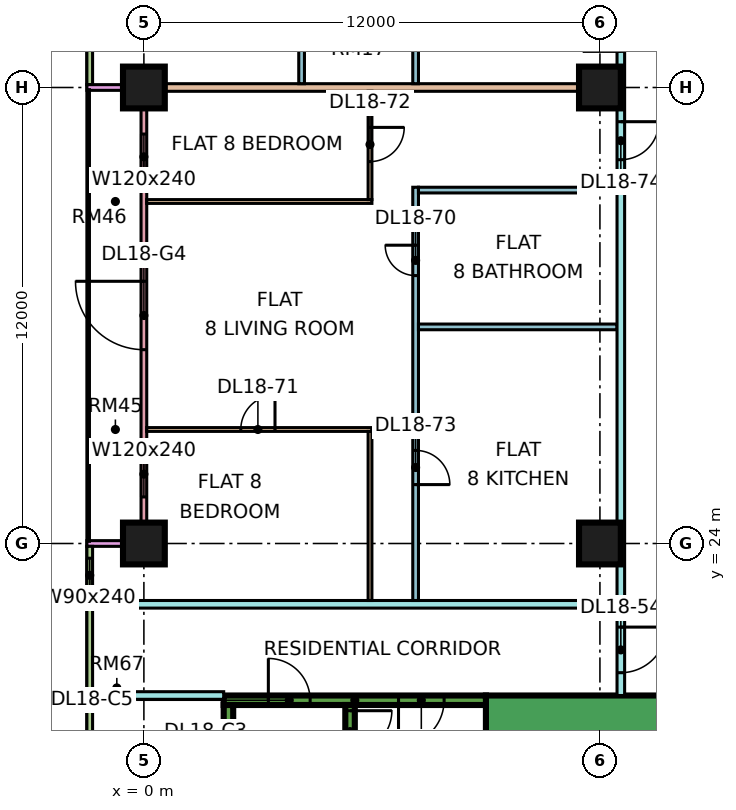
"""IFC4 building model, lengths in metres.
Left out: names, types, materials, properties, quantities, classifications, styles, units other than length and angle.
Written with IfcOpenShell. Run it as: python <this file> out.ifc"""

import sys

from ifc_helpers import new_model, si_unit, direction, frame, frame_2d, origin, origin_2d, place, context, subcontext, project, spatial, rectangle, extrude, element, fill, save


model = new_model("IFC4")
c1 = context("Model", 3, precision=1e-05, world=origin(), true_north=direction((0.0, 1.0)))
c2 = subcontext(c1, "Body", "Model", "MODEL_VIEW")
j1 = project(units=[si_unit("LENGTHUNIT", "METRE"), si_unit("PLANEANGLEUNIT", "RADIAN")], contexts=[c1])
p1 = place(None, origin())
s1 = spatial("IfcSite", under=j1, at=p1, CompositionType="ELEMENT")
p2 = place(p1, origin())
s2 = spatial("IfcBuilding", under=s1, at=p2, CompositionType="ELEMENT")
p3 = place(p2, frame((0.0, 0.0, 82.65)))
s3 = spatial("IfcBuildingStorey", under=s2, at=p3, CompositionType="ELEMENT", Elevation=82.65)
p4 = place(p3, frame((0.0, 24.0, 0.0), z_axis=(0.0, 0.0, 1.0), x_axis=(1.0, 0.0, 0.0)))
e1 = element("IfcColumn", 1, at=p4, inside=s3, PredefinedType="COLUMN", context=c2, shape_type="SweptSolid", body=[
    extrude(rectangle(XDim=1.1, YDim=1.1, at=origin_2d()), origin(), (0.0, 0.0, 1.0), 3.75),
])
p5 = place(p3, frame((0.0, 36.0, 0.0), z_axis=(0.0, 0.0, 1.0), x_axis=(1.0, 0.0, 0.0)))
e2 = element("IfcColumn", 2, at=p5, inside=s3, PredefinedType="COLUMN", context=c2, shape_type="SweptSolid", body=[
    extrude(rectangle(XDim=1.1, YDim=1.1, at=origin_2d()), origin(), (0.0, 0.0, 1.0), 3.75),
])
for number, where, z_axis, x_axis in (
    (3, (12.0, 24.0, 0.0), (0.0, 0.0, 1.0), (1.0, 0.0, 0.0)),
    (4, (12.0, 36.0, 0.0), (0.0, 0.0, 1.0), (1.0, 0.0, 0.0)),
):
    element("IfcColumn", number, at=place(p3, frame(where, z_axis=z_axis, x_axis=x_axis)), inside=s3, PredefinedType="COLUMN", context=c2, shape_type="SweptSolid", body=[
        extrude(rectangle(XDim=1.1, YDim=1.1, at=origin_2d()), origin(), (0.0, 0.0, 1.0), 3.75),
    ])
p6 = place(p3, frame((9.0, 19.45, 0.0), z_axis=(0.0, 0.0, 1.0), x_axis=(1.0, 0.0, 0.0)))
e5 = element("IfcWall", 5, at=p6, inside=s3, PredefinedType="SHEAR", context=c2, shape_type="SweptSolid", body=[
    extrude(rectangle(XDim=25.0, YDim=1.1, at=frame_2d((12.5, 0.0))), origin(), (0.0, 0.0, 1.0), 3.75),
])
p7 = place(p6, frame((19.1, 0.0, 0.0)))
e6 = element("IfcOpeningElement", 6, at=p7, cuts=e5, PredefinedType="OPENING", context=c2, shape_type="SweptSolid", body=[
    extrude(rectangle(XDim=1.8, YDim=2.4, at=frame_2d((0.9, 1.2))), frame((0.0, 0.56, 0.0), z_axis=(0.0, -1.0, 0.0), x_axis=(1.0, 0.0, 0.0)), (0.0, 0.0, 1.0), 1.12),
])
p8 = place(p3, frame((2.1, 19.875, 0.0), z_axis=(0.0, 0.0, 1.0), x_axis=(1.0, 0.0, 0.0)))
e7 = element("IfcWall", 7, at=p8, inside=s3, PredefinedType="SHEAR", context=c2, shape_type="SweptSolid", body=[
    extrude(rectangle(XDim=6.9, YDim=0.25, at=frame_2d((3.45, 0.0))), origin(), (0.0, 0.0, 1.0), 3.75),
])
p9 = place(p8, frame((1.175, 0.0, 0.0)))
e8 = element("IfcOpeningElement", 8, at=p9, cuts=e7, PredefinedType="OPENING", context=c2, shape_type="SweptSolid", body=[
    extrude(rectangle(XDim=1.1, YDim=2.2, at=frame_2d((0.55, 1.1))), frame((0.0, 0.135, 0.0), z_axis=(0.0, -1.0, 0.0), x_axis=(1.0, 0.0, 0.0)), (0.0, 0.0, 1.0), 0.27),
])
p10 = place(p8, frame((4.6, 0.0, 0.0)))
e9 = element("IfcOpeningElement", 9, at=p10, cuts=e7, PredefinedType="OPENING", context=c2, shape_type="SweptSolid", body=[
    extrude(rectangle(XDim=1.2, YDim=2.2, at=frame_2d((0.6, 1.1))), frame((0.0, 0.135, 0.0), z_axis=(0.0, -1.0, 0.0), x_axis=(1.0, 0.0, 0.0)), (0.0, 0.0, 1.0), 0.27),
])
p11 = place(p3, frame((2.225, 13.25, 0.0), z_axis=(0.0, 0.0, 1.0), x_axis=(0.0, 1.0, 0.0)))
e10 = element("IfcWall", 10, at=p11, inside=s3, PredefinedType="SHEAR", context=c2, shape_type="SweptSolid", body=[
    extrude(rectangle(XDim=6.5, YDim=0.25, at=frame_2d((3.25, 0.0))), origin(), (0.0, 0.0, 1.0), 3.75),
])
p12 = place(p3, frame((5.425, 13.25, 0.0), z_axis=(0.0, 0.0, 1.0), x_axis=(0.0, 1.0, 0.0)))
e11 = element("IfcWall", 11, at=p12, inside=s3, PredefinedType="SHEAR", context=c2, shape_type="SweptSolid", body=[
    extrude(rectangle(XDim=6.5, YDim=0.25, at=frame_2d((3.25, 0.0))), origin(), (0.0, 0.0, 1.0), 3.75),
])
p13 = place(p12, frame((5.25, 0.0, 0.0)))
e12 = element("IfcOpeningElement", 12, at=p13, cuts=e11, PredefinedType="OPENING", context=c2, shape_type="SweptSolid", body=[
    extrude(rectangle(XDim=1.1, YDim=2.2, at=frame_2d((0.55, 1.1))), frame((0.0, 0.135, 0.0), z_axis=(0.0, -1.0, 0.0), x_axis=(1.0, 0.0, 0.0)), (0.0, 0.0, 1.0), 0.27),
])
p14 = place(p3, frame((-1.425, 47.925, 0.0), z_axis=(0.0, 0.0, 1.0), x_axis=(0.0, -1.0, 0.0)))
e13 = element("IfcWall", 13, at=p14, inside=s3, PredefinedType="SOLIDWALL", context=c2, shape_type="SweptSolid", body=[
    extrude(rectangle(XDim=11.85, YDim=0.15, at=frame_2d((5.925, 0.0))), origin(), (0.0, 0.0, 1.0), 3.3),
])
p15 = place(p14, frame((1.462, 0.0, 0.45)))
e14 = element("IfcOpeningElement", 14, at=p15, cuts=e13, PredefinedType="OPENING", context=c2, shape_type="SweptSolid", body=[
    extrude(rectangle(XDim=3.0, YDim=2.4, at=frame_2d((1.5, 1.2))), frame((0.0, 0.085, 0.0), z_axis=(0.0, -1.0, 0.0), x_axis=(1.0, 0.0, 0.0)), (0.0, 0.0, 1.0), 0.17),
])
p16 = place(p14, frame((7.387, 0.0, 0.45)))
e15 = element("IfcOpeningElement", 15, at=p16, cuts=e13, PredefinedType="OPENING", context=c2, shape_type="SweptSolid", body=[
    extrude(rectangle(XDim=3.0, YDim=2.4, at=frame_2d((1.5, 1.2))), frame((0.0, 0.085, 0.0), z_axis=(0.0, -1.0, 0.0), x_axis=(1.0, 0.0, 0.0)), (0.0, 0.0, 1.0), 0.17),
])
p17 = place(p3, frame((0.0, 35.925, 0.0), z_axis=(0.0, 0.0, 1.0), x_axis=(0.0, -1.0, 0.0)))
e16 = element("IfcWall", 16, at=p17, inside=s3, PredefinedType="SOLIDWALL", context=c2, shape_type="SweptSolid", body=[
    extrude(rectangle(XDim=11.85, YDim=0.15, at=frame_2d((5.925, 0.0))), origin(), (0.0, 0.0, 1.0), 3.3),
])
p18 = place(p17, frame((1.15, 0.0, 0.45)))
e17 = element("IfcOpeningElement", 17, at=p18, cuts=e16, PredefinedType="OPENING", context=c2, shape_type="SweptSolid", body=[
    extrude(rectangle(XDim=1.2, YDim=2.4, at=frame_2d((0.6, 1.2))), frame((0.0, 0.085, 0.0), z_axis=(0.0, -1.0, 0.0), x_axis=(1.0, 0.0, 0.0)), (0.0, 0.0, 1.0), 0.17),
])
p19 = place(p17, frame((5.025, 0.0, 0.0)))
e18 = element("IfcOpeningElement", 18, at=p19, cuts=e16, PredefinedType="OPENING", context=c2, shape_type="SweptSolid", body=[
    extrude(rectangle(XDim=1.8, YDim=2.4, at=frame_2d((0.9, 1.2))), frame((0.0, 0.085, 0.0), z_axis=(0.0, -1.0, 0.0), x_axis=(1.0, 0.0, 0.0)), (0.0, 0.0, 1.0), 0.17),
])
p20 = place(p17, frame((9.5, 0.0, 0.45)))
e19 = element("IfcOpeningElement", 19, at=p20, cuts=e16, PredefinedType="OPENING", context=c2, shape_type="SweptSolid", body=[
    extrude(rectangle(XDim=1.2, YDim=2.4, at=frame_2d((0.6, 1.2))), frame((0.0, 0.085, 0.0), z_axis=(0.0, -1.0, 0.0), x_axis=(1.0, 0.0, 0.0)), (0.0, 0.0, 1.0), 0.17),
])
for number, where, z_axis, x_axis in (
    (20, (-1.5, 36.0, 0.0), (0.0, 0.0, 1.0), (1.0, 0.0, 0.0)),
    (21, (-1.5, 24.0, 0.0), (0.0, 0.0, 1.0), (1.0, 0.0, 0.0)),
):
    element("IfcWall", number, at=place(p3, frame(where, z_axis=z_axis, x_axis=x_axis)), inside=s3, PredefinedType="SOLIDWALL", context=c2, shape_type="SweptSolid", body=[
        extrude(rectangle(XDim=1.5, YDim=0.15, at=frame_2d((0.75, 0.0))), origin(), (0.0, 0.0, 1.0), 3.3),
    ])
p21 = place(p3, frame((-1.425, 23.925, 0.0), z_axis=(0.0, 0.0, 1.0), x_axis=(0.0, -1.0, 0.0)))
e22 = element("IfcWall", 22, at=p21, inside=s3, PredefinedType="SOLIDWALL", context=c2, shape_type="SweptSolid", body=[
    extrude(rectangle(XDim=11.425, YDim=0.15, at=frame_2d((5.712, 0.0))), origin(), (0.0, 0.0, 1.0), 3.3),
])
p22 = place(p21, frame((0.312, 0.0, 0.45)))
e23 = element("IfcOpeningElement", 23, at=p22, cuts=e22, PredefinedType="OPENING", context=c2, shape_type="SweptSolid", body=[
    extrude(rectangle(XDim=0.9, YDim=2.4, at=frame_2d((0.45, 1.2))), frame((0.0, 0.085, 0.0), z_axis=(0.0, -1.0, 0.0), x_axis=(1.0, 0.0, 0.0)), (0.0, 0.0, 1.0), 0.17),
])
p23 = place(p21, frame((6.175, 0.0, 0.45)))
e24 = element("IfcOpeningElement", 24, at=p23, cuts=e22, PredefinedType="OPENING", context=c2, shape_type="SweptSolid", body=[
    extrude(rectangle(XDim=3.0, YDim=2.4, at=frame_2d((1.5, 1.2))), frame((0.0, 0.085, 0.0), z_axis=(0.0, -1.0, 0.0), x_axis=(1.0, 0.0, 0.0)), (0.0, 0.0, 1.0), 0.17),
])
p24 = place(p3, frame((-1.35, 20.0, 0.0), z_axis=(0.0, 0.0, 1.0), x_axis=(1.0, 0.0, 0.0)))
e25 = element("IfcWall", 25, at=p24, inside=s3, PredefinedType="PARTITIONING", context=c2, shape_type="SweptSolid", body=[
    extrude(rectangle(XDim=3.45, YDim=0.2, at=frame_2d((1.725, 0.0))), origin(), (0.0, 0.0, 1.0), 3.3),
])
p25 = place(p3, frame((-1.35, 22.4, 0.0), z_axis=(0.0, 0.0, 1.0), x_axis=(1.0, 0.0, 0.0)))
e26 = element("IfcWall", 26, at=p25, inside=s3, PredefinedType="PARTITIONING", context=c2, shape_type="SweptSolid", body=[
    extrude(rectangle(XDim=13.8, YDim=0.2, at=frame_2d((6.9, 0.0))), origin(), (0.0, 0.0, 1.0), 3.3),
])
e27 = element("IfcWall", 27, at=p5, inside=s3, PredefinedType="PARTITIONING", context=c2, shape_type="SweptSolid", body=[
    extrude(rectangle(XDim=12.45, YDim=0.2, at=frame_2d((6.225, 0.0))), origin(), (0.0, 0.0, 1.0), 3.3),
])
p26 = place(p3, frame((0.074, 27.0, 0.0), z_axis=(0.0, 0.0, 1.0), x_axis=(1.0, 0.0, 0.0)))
e28 = element("IfcWall", 28, at=p26, inside=s3, PredefinedType="PARTITIONING", context=c2, shape_type="SweptSolid", body=[
    extrude(rectangle(XDim=5.926, YDim=0.1, at=frame_2d((2.963, 0.0))), origin(), (0.0, 0.0, 1.0), 3.3),
])
p27 = place(p26, frame((2.476, 0.0, 0.0)))
e29 = element("IfcOpeningElement", 29, at=p27, cuts=e28, PredefinedType="OPENING", context=c2, shape_type="SweptSolid", body=[
    extrude(rectangle(XDim=0.9, YDim=2.1, at=frame_2d((0.45, 1.05))), frame((0.0, 0.06, 0.0), z_axis=(0.0, -1.0, 0.0), x_axis=(1.0, 0.0, 0.0)), (0.0, 0.0, 1.0), 0.12),
])
p28 = place(p3, frame((0.074, 33.0, 0.0), z_axis=(0.0, 0.0, 1.0), x_axis=(1.0, 0.0, 0.0)))
e30 = element("IfcWall", 30, at=p28, inside=s3, PredefinedType="PARTITIONING", context=c2, shape_type="SweptSolid", body=[
    extrude(rectangle(XDim=5.926, YDim=0.1, at=frame_2d((2.963, 0.0))), origin(), (0.0, 0.0, 1.0), 3.3),
])
p29 = place(p3, frame((4.15, 36.1, 0.0), z_axis=(0.0, 0.0, 1.0), x_axis=(0.0, 1.0, 0.0)))
e31 = element("IfcWall", 31, at=p29, inside=s3, PredefinedType="PARTITIONING", context=c2, shape_type="SweptSolid", body=[
    extrude(rectangle(XDim=2.975, YDim=0.15, at=frame_2d((1.487, 0.0))), origin(), (0.0, 0.0, 1.0), 3.3),
])
p30 = place(p3, frame((5.95, 22.5, 0.0), z_axis=(0.0, 0.0, 1.0), x_axis=(0.0, 1.0, 0.0)))
e32 = element("IfcWall", 32, at=p30, inside=s3, PredefinedType="PARTITIONING", context=c2, shape_type="SweptSolid", body=[
    extrude(rectangle(XDim=4.45, YDim=0.1, at=frame_2d((2.225, 0.0))), origin(), (0.0, 0.0, 1.0), 3.3),
])
p31 = place(p3, frame((5.95, 33.05, 0.0), z_axis=(0.0, 0.0, 1.0), x_axis=(0.0, 1.0, 0.0)))
e33 = element("IfcWall", 33, at=p31, inside=s3, PredefinedType="PARTITIONING", context=c2, shape_type="SweptSolid", body=[
    extrude(rectangle(XDim=2.85, YDim=0.1, at=frame_2d((1.425, 0.0))), origin(), (0.0, 0.0, 1.0), 3.3),
])
p32 = place(p31, frame((1.0, 0.0, 0.0)))
e34 = element("IfcOpeningElement", 34, at=p32, cuts=e33, PredefinedType="OPENING", context=c2, shape_type="SweptSolid", body=[
    extrude(rectangle(XDim=0.9, YDim=2.1, at=frame_2d((0.45, 1.05))), frame((0.0, 0.06, 0.0), z_axis=(0.0, -1.0, 0.0), x_axis=(1.0, 0.0, 0.0)), (0.0, 0.0, 1.0), 0.12),
])
p33 = place(p3, frame((7.15, 22.5, 0.0), z_axis=(0.0, 0.0, 1.0), x_axis=(0.0, 1.0, 0.0)))
e35 = element("IfcWall", 35, at=p33, inside=s3, PredefinedType="PARTITIONING", context=c2, shape_type="SweptSolid", body=[
    extrude(rectangle(XDim=10.875, YDim=0.15, at=frame_2d((5.438, 0.0))), origin(), (0.0, 0.0, 1.0), 3.3),
])
p34 = place(p33, frame((8.55, 0.0, 0.0)))
e36 = element("IfcOpeningElement", 36, at=p34, cuts=e35, PredefinedType="OPENING", context=c2, shape_type="SweptSolid", body=[
    extrude(rectangle(XDim=0.8, YDim=2.1, at=frame_2d((0.4, 1.05))), frame((0.0, 0.085, 0.0), z_axis=(0.0, -1.0, 0.0), x_axis=(1.0, 0.0, 0.0)), (0.0, 0.0, 1.0), 0.17),
])
p35 = place(p33, frame((3.05, 0.0, 0.0)))
e37 = element("IfcOpeningElement", 37, at=p35, cuts=e35, PredefinedType="OPENING", context=c2, shape_type="SweptSolid", body=[
    extrude(rectangle(XDim=0.9, YDim=2.1, at=frame_2d((0.45, 1.05))), frame((0.0, 0.085, 0.0), z_axis=(0.0, -1.0, 0.0), x_axis=(1.0, 0.0, 0.0)), (0.0, 0.0, 1.0), 0.17),
])
p36 = place(p3, frame((7.15, 36.1, 0.0), z_axis=(0.0, 0.0, 1.0), x_axis=(0.0, 1.0, 0.0)))
e38 = element("IfcWall", 38, at=p36, inside=s3, PredefinedType="PARTITIONING", context=c2, shape_type="SweptSolid", body=[
    extrude(rectangle(XDim=5.95, YDim=0.15, at=frame_2d((2.975, 0.0))), origin(), (0.0, 0.0, 1.0), 3.3),
])
p37 = place(p36, frame((3.95, 0.0, 0.0)))
e39 = element("IfcOpeningElement", 39, at=p37, cuts=e38, PredefinedType="OPENING", context=c2, shape_type="SweptSolid", body=[
    extrude(rectangle(XDim=0.9, YDim=2.1, at=frame_2d((0.45, 1.05))), frame((0.0, 0.085, 0.0), z_axis=(0.0, -1.0, 0.0), x_axis=(1.0, 0.0, 0.0)), (0.0, 0.0, 1.0), 0.17),
])
for number, where, z_axis, x_axis in (
    (40, (7.225, 29.7, 0.0), (0.0, 0.0, 1.0), (1.0, 0.0, 0.0)),
    (41, (7.225, 33.3, 0.0), (0.0, 0.0, 1.0), (1.0, 0.0, 0.0)),
):
    element("IfcWall", number, at=place(p3, frame(where, z_axis=z_axis, x_axis=x_axis)), inside=s3, PredefinedType="PARTITIONING", context=c2, shape_type="SweptSolid", body=[
        extrude(rectangle(XDim=5.225, YDim=0.15, at=frame_2d((2.612, 0.0))), origin(), (0.0, 0.0, 1.0), 3.3),
    ])
p38 = place(p3, frame((12.55, 20.0, 0.0), z_axis=(0.0, 0.0, 1.0), x_axis=(0.0, 1.0, 0.0)))
e42 = element("IfcWall", 42, at=p38, inside=s3, PredefinedType="PARTITIONING", context=c2, shape_type="SweptSolid", body=[
    extrude(rectangle(XDim=43.0, YDim=0.2, at=frame_2d((21.5, 0.0))), origin(), (0.0, 0.0, 1.0), 3.3),
])
p39 = place(p38, frame((16.95, 0.0, 0.0)))
e43 = element("IfcOpeningElement", 43, at=p39, cuts=e42, PredefinedType="OPENING", context=c2, shape_type="SweptSolid", body=[
    extrude(rectangle(XDim=1.0, YDim=2.1, at=frame_2d((0.5, 1.05))), frame((0.0, 0.11, 0.0), z_axis=(0.0, -1.0, 0.0), x_axis=(1.0, 0.0, 0.0)), (0.0, 0.0, 1.0), 0.22),
])
p40 = place(p38, frame((35.25, 0.0, 0.0)))
e44 = element("IfcOpeningElement", 44, at=p40, cuts=e42, PredefinedType="OPENING", context=c2, shape_type="SweptSolid", body=[
    extrude(rectangle(XDim=1.0, YDim=2.1, at=frame_2d((0.5, 1.05))), frame((0.0, 0.11, 0.0), z_axis=(0.0, -1.0, 0.0), x_axis=(1.0, 0.0, 0.0)), (0.0, 0.0, 1.0), 0.22),
])
p41 = place(p38, frame((0.6, 0.0, 0.0)))
e45 = element("IfcOpeningElement", 45, at=p41, cuts=e42, PredefinedType="OPENING", context=c2, shape_type="SweptSolid", body=[
    extrude(rectangle(XDim=1.2, YDim=2.1, at=frame_2d((0.6, 1.05))), frame((0.0, 0.11, 0.0), z_axis=(0.0, -1.0, 0.0), x_axis=(1.0, 0.0, 0.0)), (0.0, 0.0, 1.0), 0.22),
])
p42 = place(p38, frame((14.1, 0.0, 0.0)))
e46 = element("IfcOpeningElement", 46, at=p42, cuts=e42, PredefinedType="OPENING", context=c2, shape_type="SweptSolid", body=[
    extrude(rectangle(XDim=1.0, YDim=2.1, at=frame_2d((0.5, 1.05))), frame((0.0, 0.11, 0.0), z_axis=(0.0, -1.0, 0.0), x_axis=(1.0, 0.0, 0.0)), (0.0, 0.0, 1.0), 0.22),
])
p43 = place(p18, origin())
e47 = element("IfcWindow", 47, at=p43, inside=s3, PartitioningType="SINGLE_PANEL", PredefinedType="WINDOW", context=c2, shape_type="SweptSolid", body=[
    extrude(rectangle(XDim=1.2, YDim=2.4, at=frame_2d((0.6, 1.2))), frame((0.0, 0.03, 0.0), z_axis=(0.0, -1.0, 0.0), x_axis=(1.0, 0.0, 0.0)), (0.0, 0.0, 1.0), 0.06),
])
fill(e17, e47)
p44 = place(p19, frame((1.8, 0.0, 0.0), z_axis=(0.0, 0.0, 1.0), x_axis=(-1.0, 0.0, 0.0)))
e48 = element("IfcDoor", 48, at=p44, inside=s3, OperationType="DOUBLE_DOOR_SINGLE_SWING", PredefinedType="DOOR", context=c2, shape_type="SweptSolid", body=[
    extrude(rectangle(XDim=1.8, YDim=2.4, at=frame_2d((0.9, 1.2))), frame((0.0, 0.025, 0.0), z_axis=(0.0, -1.0, 0.0), x_axis=(1.0, 0.0, 0.0)), (0.0, 0.0, 1.0), 0.05),
])
fill(e18, e48)
p45 = place(p20, origin())
e49 = element("IfcWindow", 49, at=p45, inside=s3, PartitioningType="SINGLE_PANEL", PredefinedType="WINDOW", context=c2, shape_type="SweptSolid", body=[
    extrude(rectangle(XDim=1.2, YDim=2.4, at=frame_2d((0.6, 1.2))), frame((0.0, 0.03, 0.0), z_axis=(0.0, -1.0, 0.0), x_axis=(1.0, 0.0, 0.0)), (0.0, 0.0, 1.0), 0.06),
])
fill(e19, e49)
p46 = place(p22, origin())
e50 = element("IfcWindow", 50, at=p46, inside=s3, PartitioningType="SINGLE_PANEL", PredefinedType="WINDOW", context=c2, shape_type="SweptSolid", body=[
    extrude(rectangle(XDim=0.9, YDim=2.4, at=frame_2d((0.45, 1.2))), frame((0.0, 0.03, 0.0), z_axis=(0.0, -1.0, 0.0), x_axis=(1.0, 0.0, 0.0)), (0.0, 0.0, 1.0), 0.06),
])
fill(e23, e50)
p47 = place(p13, origin())
e51 = element("IfcDoor", 51, at=p47, inside=s3, OperationType="SINGLE_SWING_RIGHT", PredefinedType="DOOR", context=c2, shape_type="SweptSolid", body=[
    extrude(rectangle(XDim=1.1, YDim=2.2, at=frame_2d((0.55, 1.1))), frame((0.0, 0.025, 0.0), z_axis=(0.0, -1.0, 0.0), x_axis=(1.0, 0.0, 0.0)), (0.0, 0.0, 1.0), 0.05),
])
fill(e12, e51)
p48 = place(p9, origin())
e52 = element("IfcDoor", 52, at=p48, inside=s3, OperationType="SINGLE_SWING_LEFT", PredefinedType="DOOR", context=c2, shape_type="SweptSolid", body=[
    extrude(rectangle(XDim=1.1, YDim=2.2, at=frame_2d((0.55, 1.1))), frame((0.0, 0.025, 0.0), z_axis=(0.0, -1.0, 0.0), x_axis=(1.0, 0.0, 0.0)), (0.0, 0.0, 1.0), 0.05),
])
fill(e8, e52)
p49 = place(p10, frame((1.2, 0.0, 0.0), z_axis=(0.0, 0.0, 1.0), x_axis=(-1.0, 0.0, 0.0)))
e53 = element("IfcDoor", 53, at=p49, inside=s3, OperationType="SINGLE_SWING_LEFT", PredefinedType="DOOR", context=c2, shape_type="SweptSolid", body=[
    extrude(rectangle(XDim=1.2, YDim=2.2, at=frame_2d((0.6, 1.1))), frame((0.0, 0.025, 0.0), z_axis=(0.0, -1.0, 0.0), x_axis=(1.0, 0.0, 0.0)), (0.0, 0.0, 1.0), 0.05),
])
fill(e9, e53)
p50 = place(p41, origin())
e54 = element("IfcDoor", 54, at=p50, inside=s3, OperationType="SINGLE_SWING_RIGHT", PredefinedType="DOOR", context=c2, shape_type="SweptSolid", body=[
    extrude(rectangle(XDim=1.2, YDim=2.1, at=frame_2d((0.6, 1.05))), frame((0.0, 0.025, 0.0), z_axis=(0.0, -1.0, 0.0), x_axis=(1.0, 0.0, 0.0)), (0.0, 0.0, 1.0), 0.05),
])
fill(e45, e54)
p51 = place(p34, frame((0.8, 0.0, 0.0), z_axis=(0.0, 0.0, 1.0), x_axis=(-1.0, 0.0, 0.0)))
e55 = element("IfcDoor", 55, at=p51, inside=s3, OperationType="SINGLE_SWING_RIGHT", PredefinedType="DOOR", context=c2, shape_type="SweptSolid", body=[
    extrude(rectangle(XDim=0.8, YDim=2.1, at=frame_2d((0.4, 1.05))), frame((0.0, 0.025, 0.0), z_axis=(0.0, -1.0, 0.0), x_axis=(1.0, 0.0, 0.0)), (0.0, 0.0, 1.0), 0.05),
])
fill(e36, e55)
p52 = place(p27, frame((0.9, 0.0, 0.0), z_axis=(0.0, 0.0, 1.0), x_axis=(-1.0, 0.0, 0.0)))
e56 = element("IfcDoor", 56, at=p52, inside=s3, OperationType="SINGLE_SWING_RIGHT", PredefinedType="DOOR", context=c2, shape_type="SweptSolid", body=[
    extrude(rectangle(XDim=0.9, YDim=2.1, at=frame_2d((0.45, 1.05))), frame((0.0, 0.025, 0.0), z_axis=(0.0, -1.0, 0.0), x_axis=(1.0, 0.0, 0.0)), (0.0, 0.0, 1.0), 0.05),
])
fill(e29, e56)
p53 = place(p32, origin())
e57 = element("IfcDoor", 57, at=p53, inside=s3, OperationType="SINGLE_SWING_RIGHT", PredefinedType="DOOR", context=c2, shape_type="SweptSolid", body=[
    extrude(rectangle(XDim=0.9, YDim=2.1, at=frame_2d((0.45, 1.05))), frame((0.0, 0.025, 0.0), z_axis=(0.0, -1.0, 0.0), x_axis=(1.0, 0.0, 0.0)), (0.0, 0.0, 1.0), 0.05),
])
fill(e34, e57)
p54 = place(p35, frame((0.9, 0.0, 0.0), z_axis=(0.0, 0.0, 1.0), x_axis=(-1.0, 0.0, 0.0)))
e58 = element("IfcDoor", 58, at=p54, inside=s3, OperationType="SINGLE_SWING_LEFT", PredefinedType="DOOR", context=c2, shape_type="SweptSolid", body=[
    extrude(rectangle(XDim=0.9, YDim=2.1, at=frame_2d((0.45, 1.05))), frame((0.0, 0.025, 0.0), z_axis=(0.0, -1.0, 0.0), x_axis=(1.0, 0.0, 0.0)), (0.0, 0.0, 1.0), 0.05),
])
fill(e37, e58)
p55 = place(p42, origin())
e59 = element("IfcDoor", 59, at=p55, inside=s3, OperationType="SINGLE_SWING_RIGHT", PredefinedType="DOOR", context=c2, shape_type="SweptSolid", body=[
    extrude(rectangle(XDim=1.0, YDim=2.1, at=frame_2d((0.5, 1.05))), frame((0.0, 0.025, 0.0), z_axis=(0.0, -1.0, 0.0), x_axis=(1.0, 0.0, 0.0)), (0.0, 0.0, 1.0), 0.05),
])
fill(e46, e59)
save(model, sys.argv[1])
